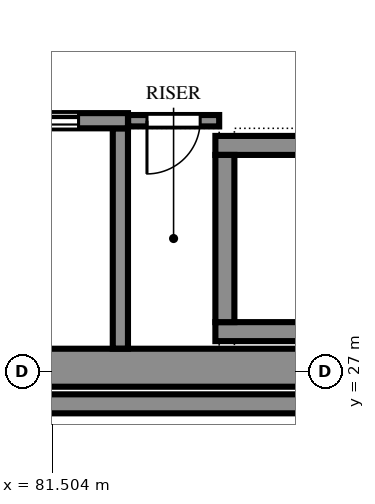
"""IFC4 building model, lengths in metres.
Left out: names, types, materials, properties, quantities, classifications, styles, units other than length and angle.
Written with IfcOpenShell. Run it as: python <this file> out.ifc"""

import sys

from ifc_helpers import new_model, si_unit, direction, frame, frame_2d, origin, place, context, subcontext, project, spatial, polyline, rectangle, outline, extrude, element, fill, save


model = new_model("IFC4")
c1 = context("Model", 3, precision=1e-05, world=origin(), true_north=direction((0.0, 1.0)))
c2 = subcontext(c1, "Body", "Model", "MODEL_VIEW")
j1 = project(units=[si_unit("LENGTHUNIT", "METRE"), si_unit("PLANEANGLEUNIT", "RADIAN")], contexts=[c1])
p1 = place(None, origin())
s1 = spatial("IfcSite", under=j1, at=p1, CompositionType="ELEMENT")
p2 = place(p1, origin())
s2 = spatial("IfcBuilding", under=s1, at=p2, CompositionType="ELEMENT")
p3 = place(p2, frame((0.0, 0.0, 11.7)))
s3 = spatial("IfcBuildingStorey", under=s2, at=p3, CompositionType="ELEMENT", Elevation=11.7)
p4 = place(p3, frame((71.8, 27.05, 0.0), z_axis=(0.0, 0.0, 1.0), x_axis=(1.0, 0.0, 0.0)))
e1 = element("IfcWall", 1, at=p4, inside=s3, PredefinedType="SOLIDWALL", context=c2, shape_type="SweptSolid", body=[
    extrude(rectangle(XDim=18.4, YDim=0.5, at=frame_2d((9.2, 0.0))), origin(), (0.0, 0.0, 1.0), 4.2),
])
p5 = place(p3, frame((71.45, 26.575, 0.0), z_axis=(0.0, 0.0, 1.0), x_axis=(1.0, 0.0, 0.0)))
e2 = element("IfcWall", 2, at=p5, inside=s3, PredefinedType="SOLIDWALL", context=c2, shape_type="SweptSolid", body=[
    extrude(outline(polyline([(0.0, 0.0), (19.1, 0.0), (19.1, 12.6), (0.0, 12.6), (0.0, 0.0)]), holes=[polyline([(1.308, 2.439), (1.352, 2.546), (1.408, 2.646), (1.475, 2.74), (1.552, 2.826), (1.638, 2.903), (1.732, 2.969), (1.833, 3.025), (1.939, 3.068), (2.05, 3.1), (2.161, 3.068), (2.267, 3.025), (2.368, 2.969), (2.462, 2.903), (2.549, 2.826), (2.625, 2.74), (2.692, 2.646), (2.748, 2.546), (2.792, 2.439), (2.824, 2.329), (2.844, 2.215), (2.85, 2.1), (2.85, 0.6), (1.25, 0.6), (1.25, 2.1), (1.257, 2.215), (1.276, 2.329), (1.308, 2.439)]), polyline([(4.308, 2.439), (4.352, 2.546), (4.408, 2.646), (4.475, 2.74), (4.552, 2.826), (4.638, 2.903), (4.732, 2.969), (4.833, 3.025), (4.939, 3.068), (5.05, 3.1), (5.161, 3.068), (5.267, 3.025), (5.368, 2.969), (5.462, 2.903), (5.549, 2.826), (5.625, 2.74), (5.692, 2.646), (5.748, 2.546), (5.792, 2.439), (5.824, 2.329), (5.844, 2.215), (5.85, 2.1), (5.85, 0.6), (4.25, 0.6), (4.25, 2.1), (4.257, 2.215), (4.276, 2.329), (4.308, 2.439)]), polyline([(7.308, 2.439), (7.352, 2.546), (7.408, 2.646), (7.475, 2.74), (7.552, 2.826), (7.638, 2.903), (7.732, 2.969), (7.833, 3.025), (7.939, 3.068), (8.05, 3.1), (8.161, 3.068), (8.267, 3.025), (8.368, 2.969), (8.462, 2.903), (8.549, 2.826), (8.625, 2.74), (8.692, 2.646), (8.748, 2.546), (8.792, 2.439), (8.824, 2.329), (8.844, 2.215), (8.85, 2.1), (8.85, 0.6), (7.25, 0.6), (7.25, 2.1), (7.257, 2.215), (7.276, 2.329), (7.308, 2.439)]), polyline([(1.308, 6.639), (1.352, 6.746), (1.408, 6.846), (1.475, 6.94), (1.552, 7.026), (1.638, 7.103), (1.732, 7.169), (1.833, 7.225), (1.939, 7.269), (2.05, 7.3), (2.161, 7.269), (2.267, 7.225), (2.368, 7.169), (2.462, 7.103), (2.549, 7.026), (2.625, 6.94), (2.692, 6.846), (2.748, 6.746), (2.792, 6.639), (2.824, 6.529), (2.844, 6.415), (2.85, 6.3), (2.85, 4.8), (1.25, 4.8), (1.25, 6.3), (1.257, 6.415), (1.276, 6.529), (1.308, 6.639)]), polyline([(4.308, 6.639), (4.352, 6.746), (4.408, 6.846), (4.475, 6.94), (4.552, 7.026), (4.638, 7.103), (4.732, 7.169), (4.833, 7.225), (4.939, 7.269), (5.05, 7.3), (5.161, 7.269), (5.267, 7.225), (5.368, 7.169), (5.462, 7.103), (5.549, 7.026), (5.625, 6.94), (5.692, 6.846), (5.748, 6.746), (5.792, 6.639), (5.824, 6.529), (5.844, 6.415), (5.85, 6.3), (5.85, 4.8), (4.25, 4.8), (4.25, 6.3), (4.257, 6.415), (4.276, 6.529), (4.308, 6.639)]), polyline([(7.308, 6.639), (7.352, 6.746), (7.408, 6.846), (7.475, 6.94), (7.552, 7.026), (7.638, 7.103), (7.732, 7.169), (7.833, 7.225), (7.939, 7.269), (8.05, 7.3), (8.161, 7.269), (8.267, 7.225), (8.368, 7.169), (8.462, 7.103), (8.549, 7.026), (8.625, 6.94), (8.692, 6.846), (8.748, 6.746), (8.792, 6.639), (8.824, 6.529), (8.844, 6.415), (8.85, 6.3), (8.85, 4.8), (7.25, 4.8), (7.25, 6.3), (7.257, 6.415), (7.276, 6.529), (7.308, 6.639)]), polyline([(1.308, 10.839), (1.352, 10.946), (1.408, 11.046), (1.475, 11.14), (1.552, 11.226), (1.638, 11.303), (1.732, 11.369), (1.833, 11.425), (1.939, 11.469), (2.05, 11.5), (2.161, 11.469), (2.267, 11.425), (2.368, 11.369), (2.462, 11.303), (2.549, 11.226), (2.625, 11.14), (2.692, 11.046), (2.748, 10.946), (2.792, 10.839), (2.824, 10.729), (2.844, 10.615), (2.85, 10.5), (2.85, 9.0), (1.25, 9.0), (1.25, 10.5), (1.257, 10.615), (1.276, 10.729), (1.308, 10.839)]), polyline([(4.352, 10.946), (4.408, 11.046), (4.475, 11.14), (4.552, 11.226), (4.638, 11.303), (4.732, 11.369), (4.833, 11.425), (4.939, 11.469), (5.05, 11.5), (5.161, 11.469), (5.267, 11.425), (5.368, 11.369), (5.462, 11.303), (5.549, 11.226), (5.625, 11.14), (5.692, 11.046), (5.748, 10.946), (5.792, 10.839), (5.824, 10.729), (5.844, 10.615), (5.85, 10.5), (5.85, 9.0), (4.25, 9.0), (4.25, 10.5), (4.257, 10.615), (4.276, 10.729), (4.308, 10.839), (4.352, 10.946)]), polyline([(7.352, 10.946), (7.408, 11.046), (7.475, 11.14), (7.552, 11.226), (7.638, 11.303), (7.732, 11.369), (7.833, 11.425), (7.939, 11.469), (8.05, 11.5), (8.161, 11.469), (8.267, 11.425), (8.368, 11.369), (8.462, 11.303), (8.549, 11.226), (8.625, 11.14), (8.692, 11.046), (8.748, 10.946), (8.792, 10.839), (8.824, 10.729), (8.844, 10.615), (8.85, 10.5), (8.85, 9.0), (7.25, 9.0), (7.25, 10.5), (7.257, 10.615), (7.276, 10.729), (7.308, 10.839), (7.352, 10.946)]), polyline([(10.308, 2.439), (10.352, 2.546), (10.408, 2.646), (10.475, 2.74), (10.552, 2.826), (10.638, 2.903), (10.732, 2.969), (10.833, 3.025), (10.939, 3.068), (11.05, 3.1), (11.161, 3.068), (11.267, 3.025), (11.368, 2.969), (11.462, 2.903), (11.549, 2.826), (11.625, 2.74), (11.692, 2.646), (11.748, 2.546), (11.792, 2.439), (11.824, 2.329), (11.844, 2.215), (11.85, 2.1), (11.85, 0.6), (10.25, 0.6), (10.25, 2.1), (10.257, 2.215), (10.276, 2.329), (10.308, 2.439)]), polyline([(13.308, 2.439), (13.352, 2.546), (13.408, 2.646), (13.475, 2.74), (13.552, 2.826), (13.638, 2.903), (13.732, 2.969), (13.833, 3.025), (13.939, 3.068), (14.05, 3.1), (14.161, 3.068), (14.267, 3.025), (14.368, 2.969), (14.462, 2.903), (14.549, 2.826), (14.625, 2.74), (14.692, 2.646), (14.748, 2.546), (14.792, 2.439), (14.824, 2.329), (14.844, 2.215), (14.85, 2.1), (14.85, 0.6), (13.25, 0.6), (13.25, 2.1), (13.257, 2.215), (13.276, 2.329), (13.308, 2.439)]), polyline([(16.308, 2.439), (16.352, 2.546), (16.408, 2.646), (16.475, 2.74), (16.552, 2.826), (16.638, 2.903), (16.732, 2.969), (16.833, 3.025), (16.939, 3.068), (17.05, 3.1), (17.161, 3.068), (17.267, 3.025), (17.368, 2.969), (17.462, 2.903), (17.549, 2.826), (17.625, 2.74), (17.692, 2.646), (17.748, 2.546), (17.792, 2.439), (17.824, 2.329), (17.844, 2.215), (17.85, 2.1), (17.85, 0.6), (16.25, 0.6), (16.25, 2.1), (16.257, 2.215), (16.276, 2.329), (16.308, 2.439)]), polyline([(10.308, 6.639), (10.352, 6.746), (10.408, 6.846), (10.475, 6.94), (10.552, 7.026), (10.638, 7.103), (10.732, 7.169), (10.833, 7.225), (10.939, 7.269), (11.05, 7.3), (11.161, 7.269), (11.267, 7.225), (11.368, 7.169), (11.462, 7.103), (11.549, 7.026), (11.625, 6.94), (11.692, 6.846), (11.748, 6.746), (11.792, 6.639), (11.824, 6.529), (11.844, 6.415), (11.85, 6.3), (11.85, 4.8), (10.25, 4.8), (10.25, 6.3), (10.257, 6.415), (10.276, 6.529), (10.308, 6.639)]), polyline([(13.308, 6.639), (13.352, 6.746), (13.408, 6.846), (13.475, 6.94), (13.552, 7.026), (13.638, 7.103), (13.732, 7.169), (13.833, 7.225), (13.939, 7.269), (14.05, 7.3), (14.161, 7.269), (14.267, 7.225), (14.368, 7.169), (14.462, 7.103), (14.549, 7.026), (14.625, 6.94), (14.692, 6.846), (14.748, 6.746), (14.792, 6.639), (14.824, 6.529), (14.844, 6.415), (14.85, 6.3), (14.85, 4.8), (13.25, 4.8), (13.25, 6.3), (13.257, 6.415), (13.276, 6.529), (13.308, 6.639)]), polyline([(16.308, 6.639), (16.352, 6.746), (16.408, 6.846), (16.475, 6.94), (16.552, 7.026), (16.638, 7.103), (16.732, 7.169), (16.833, 7.225), (16.939, 7.269), (17.05, 7.3), (17.161, 7.269), (17.267, 7.225), (17.368, 7.169), (17.462, 7.103), (17.549, 7.026), (17.625, 6.94), (17.692, 6.846), (17.748, 6.746), (17.792, 6.639), (17.824, 6.529), (17.844, 6.415), (17.85, 6.3), (17.85, 4.8), (16.25, 4.8), (16.25, 6.3), (16.257, 6.415), (16.276, 6.529), (16.308, 6.639)]), polyline([(10.308, 10.839), (10.352, 10.946), (10.408, 11.046), (10.475, 11.14), (10.552, 11.226), (10.638, 11.303), (10.732, 11.369), (10.833, 11.425), (10.939, 11.469), (11.05, 11.5), (11.161, 11.469), (11.267, 11.425), (11.368, 11.369), (11.462, 11.303), (11.549, 11.226), (11.625, 11.14), (11.692, 11.046), (11.748, 10.946), (11.792, 10.839), (11.824, 10.729), (11.844, 10.615), (11.85, 10.5), (11.85, 9.0), (10.25, 9.0), (10.25, 10.5), (10.257, 10.615), (10.276, 10.729), (10.308, 10.839)]), polyline([(13.352, 10.946), (13.408, 11.046), (13.475, 11.14), (13.552, 11.226), (13.638, 11.303), (13.732, 11.369), (13.833, 11.425), (13.939, 11.469), (14.05, 11.5), (14.161, 11.469), (14.267, 11.425), (14.368, 11.369), (14.462, 11.303), (14.549, 11.226), (14.625, 11.14), (14.692, 11.046), (14.748, 10.946), (14.792, 10.839), (14.824, 10.729), (14.844, 10.615), (14.85, 10.5), (14.85, 9.0), (13.25, 9.0), (13.25, 10.5), (13.257, 10.615), (13.276, 10.729), (13.308, 10.839), (13.352, 10.946)]), polyline([(16.352, 10.946), (16.408, 11.046), (16.475, 11.14), (16.552, 11.226), (16.638, 11.303), (16.732, 11.369), (16.833, 11.425), (16.939, 11.469), (17.05, 11.5), (17.161, 11.469), (17.267, 11.425), (17.368, 11.369), (17.462, 11.303), (17.549, 11.226), (17.625, 11.14), (17.692, 11.046), (17.748, 10.946), (17.792, 10.839), (17.824, 10.729), (17.844, 10.615), (17.85, 10.5), (17.85, 9.0), (16.25, 9.0), (16.25, 10.5), (16.257, 10.615), (16.276, 10.729), (16.308, 10.839), (16.352, 10.946)])]), frame((0.0, 0.125, 0.0), z_axis=(0.0, -1.0, 0.0), x_axis=(1.0, 0.0, 0.0)), (0.0, 0.0, 1.0), 0.25),
])
p6 = place(p3, frame((80.302, 30.3, 0.0), z_axis=(0.0, 0.0, 1.0), x_axis=(1.0, 0.0, 0.0)))
e3 = element("IfcWall", 3, at=p6, inside=s3, PredefinedType="SOLIDWALL", context=c2, shape_type="SweptSolid", body=[
    extrude(rectangle(XDim=2.198, YDim=0.2, at=frame_2d((1.099, 0.0))), origin(), (0.0, 0.0, 1.0), 3.516),
])
p7 = place(p6, frame((0.448, 0.0, 0.0)))
e4 = element("IfcOpeningElement", 4, at=p7, cuts=e3, PredefinedType="OPENING", context=c2, shape_type="SweptSolid", body=[
    extrude(rectangle(XDim=1.1, YDim=2.1, at=frame_2d((0.55, 1.05))), frame((0.0, 0.11, 0.0), z_axis=(0.0, -1.0, 0.0), x_axis=(1.0, 0.0, 0.0)), (0.0, 0.0, 1.0), 0.22),
])
p8 = place(p3, frame((82.4, 27.302, 0.0), z_axis=(0.0, 0.0, 1.0), x_axis=(0.0, 1.0, 0.0)))
e5 = element("IfcWall", 5, at=p8, inside=s3, PredefinedType="SOLIDWALL", context=c2, shape_type="SweptSolid", body=[
    extrude(rectangle(XDim=2.898, YDim=0.2, at=frame_2d((1.449, 0.0))), origin(), (0.0, 0.0, 1.0), 3.516),
])
for number, where, z_axis, x_axis in (
    (6, (83.65, 27.525, 0.0), (0.0, 0.0, 1.0), (1.0, 0.0, 0.0)),
    (7, (83.65, 29.975, 0.0), (0.0, 0.0, 1.0), (1.0, 0.0, 0.0)),
):
    element("IfcWall", number, at=place(p3, frame(where, z_axis=z_axis, x_axis=x_axis)), inside=s3, PredefinedType="SOLIDWALL", context=c2, shape_type="SweptSolid", body=[
        extrude(rectangle(XDim=3.4, YDim=0.25, at=frame_2d((1.7, 0.0))), origin(), (0.0, 0.0, 1.0), 3.516),
    ])
p9 = place(p3, frame((83.775, 27.65, 0.0), z_axis=(0.0, 0.0, 1.0), x_axis=(0.0, 1.0, 0.0)))
e8 = element("IfcWall", 8, at=p9, inside=s3, PredefinedType="SOLIDWALL", context=c2, shape_type="SweptSolid", body=[
    extrude(rectangle(XDim=2.2, YDim=0.25, at=frame_2d((1.1, 0.0))), origin(), (0.0, 0.0, 1.0), 3.516),
])
p10 = place(p3, frame((83.7, 30.3, 0.0), z_axis=(0.0, 0.0, 1.0), x_axis=(-1.0, 0.0, 0.0)))
e9 = element("IfcWall", 9, at=p10, inside=s3, PredefinedType="SOLIDWALL", context=c2, shape_type="SweptSolid", body=[
    extrude(rectangle(XDim=1.198, YDim=0.15, at=frame_2d((0.599, 0.0))), origin(), (0.0, 0.0, 1.0), 3.516),
])
p11 = place(p10, frame((0.25, 0.0, 0.0)))
e10 = element("IfcOpeningElement", 10, at=p11, cuts=e9, PredefinedType="OPENING", context=c2, shape_type="SweptSolid", body=[
    extrude(rectangle(XDim=0.7, YDim=2.0, at=frame_2d((0.35, 1.0))), frame((0.0, 0.085, 0.0), z_axis=(0.0, -1.0, 0.0), x_axis=(1.0, 0.0, 0.0)), (0.0, 0.0, 1.0), 0.17),
])
p12 = place(p7, origin())
e11 = element("IfcDoor", 11, at=p12, inside=s3, OperationType="SLIDING_TO_LEFT", PredefinedType="DOOR", context=c2, shape_type="SweptSolid", body=[
    extrude(outline(polyline([(0.0, 0.0), (0.07, 0.0), (0.07, 2.03), (1.03, 2.03), (1.03, 0.0), (1.1, 0.0), (1.1, 2.1), (0.0, 2.1), (0.0, 0.0)])), frame((0.0, 0.025, 0.0), z_axis=(0.0, -1.0, 0.0), x_axis=(1.0, 0.0, 0.0)), (0.0, 0.0, 1.0), 0.05),
    extrude(rectangle(XDim=0.524, YDim=2.016, at=frame_2d((0.336, 1.018))), frame((0.0, 0.018, 0.0), z_axis=(0.0, -1.0, 0.0), x_axis=(1.0, 0.0, 0.0)), (0.0, 0.0, 1.0), 0.016),
    extrude(rectangle(XDim=0.52, YDim=2.016, at=frame_2d((0.766, 1.018))), frame((0.0, -0.002, 0.0), z_axis=(0.0, -1.0, 0.0), x_axis=(1.0, 0.0, 0.0)), (0.0, 0.0, 1.0), 0.016),
])
fill(e4, e11)
p13 = place(p11, origin())
e12 = element("IfcDoor", 12, at=p13, inside=s3, OperationType="SINGLE_SWING_RIGHT", PredefinedType="DOOR", context=c2, shape_type="SweptSolid", body=[
    extrude(outline(polyline([(0.0, 0.0), (0.07, 0.0), (0.07, 1.93), (0.63, 1.93), (0.63, 0.0), (0.7, 0.0), (0.7, 2.0), (0.0, 2.0), (0.0, 0.0)])), frame((0.0, 0.025, 0.0), z_axis=(0.0, -1.0, 0.0), x_axis=(1.0, 0.0, 0.0)), (0.0, 0.0, 1.0), 0.05),
    extrude(outline(polyline([(0.074, 0.01), (0.626, 0.01), (0.626, 1.926), (0.074, 1.926), (0.074, 0.01)]), holes=[polyline([(0.184, 0.16), (0.516, 0.16), (0.516, 1.01), (0.184, 1.01), (0.184, 0.16)]), polyline([(0.2, 1.16), (0.5, 1.16), (0.5, 1.76), (0.2, 1.76), (0.2, 1.16)])]), frame((0.0, 0.017, 0.0), z_axis=(0.0, -1.0, 0.0), x_axis=(1.0, 0.0, 0.0)), (0.0, 0.0, 1.0), 0.035),
    extrude(rectangle(XDim=0.331, YDim=0.85, at=frame_2d((0.35, 0.585))), frame((0.0, 0.009, 0.0), z_axis=(0.0, -1.0, 0.0), x_axis=(1.0, 0.0, 0.0)), (0.0, 0.0, 1.0), 0.017),
    extrude(rectangle(XDim=0.3, YDim=0.6, at=frame_2d((0.35, 1.46))), frame((0.0, 0.006, 0.0), z_axis=(0.0, -1.0, 0.0), x_axis=(1.0, 0.0, 0.0)), (0.0, 0.0, 1.0), 0.012),
])
fill(e10, e12)
save(model, sys.argv[1])
